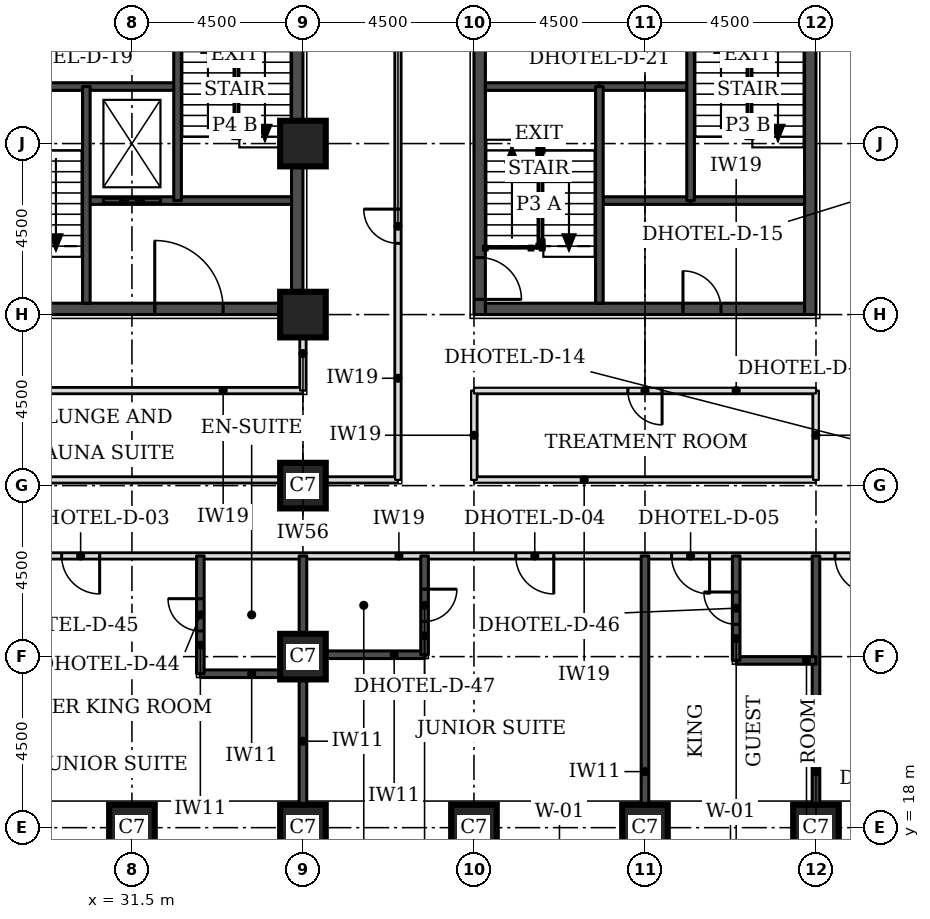
"""IFC4 building model, lengths in metres.
Left out: names, types, materials, properties, quantities, classifications, styles, units other than length and angle.
Written with IfcOpenShell. Run it as: python <this file> out.ifc"""

import sys

from ifc_helpers import new_model, si_unit, direction, frame, frame_2d, origin, origin_2d, place, context, subcontext, project, spatial, rectangle, extrude, element, fill, save


model = new_model("IFC4")
c1 = context("Model", 3, precision=1e-05, world=origin(), true_north=direction((0.0, 1.0)))
c2 = subcontext(c1, "Body", "Model", "MODEL_VIEW")
j1 = project(units=[si_unit("LENGTHUNIT", "METRE"), si_unit("PLANEANGLEUNIT", "RADIAN")], contexts=[c1])
p1 = place(None, origin())
s1 = spatial("IfcSite", under=j1, at=p1, CompositionType="ELEMENT")
p2 = place(p1, origin())
s2 = spatial("IfcBuilding", under=s1, at=p2, CompositionType="ELEMENT")
p3 = place(p2, frame((0.0, 0.0, 59.4)))
s3 = spatial("IfcBuildingStorey", under=s2, at=p3, CompositionType="ELEMENT", Elevation=59.4)
for number, where, z_axis, x_axis in (
    (1, (31.5, 18.0, 0.0), (0.0, 0.0, 1.0), (1.0, 0.0, 0.0)),
    (2, (36.0, 18.0, 0.0), (0.0, 0.0, 1.0), (1.0, 0.0, 0.0)),
    (3, (40.5, 18.0, 0.0), (0.0, 0.0, 1.0), (1.0, 0.0, 0.0)),
    (4, (45.0, 18.0, 0.0), (0.0, 0.0, 1.0), (1.0, 0.0, 0.0)),
    (5, (49.5, 18.0, 0.0), (0.0, 0.0, 1.0), (1.0, 0.0, 0.0)),
    (6, (36.0, 22.5, 0.0), (0.0, 0.0, 1.0), (1.0, 0.0, 0.0)),
    (7, (36.0, 27.0, 0.0), (0.0, 0.0, 1.0), (1.0, 0.0, 0.0)),
    (8, (36.0, 31.5, 0.0), (0.0, 0.0, 1.0), (1.0, 0.0, 0.0)),
    (9, (36.0, 36.0, 0.0), (0.0, 0.0, 1.0), (1.0, 0.0, 0.0)),
):
    element("IfcColumn", number, at=place(p3, frame(where, z_axis=z_axis, x_axis=x_axis)), inside=s3, PredefinedType="COLUMN", context=c2, shape_type="SweptSolid", body=[
        extrude(rectangle(XDim=1.2, YDim=1.2, at=origin_2d()), origin(), (0.0, 0.0, 1.0), 3.3),
    ])
p4 = place(p3, frame((40.8, 31.65, 0.0), z_axis=(0.0, 0.0, 1.0), x_axis=(1.0, 0.0, 0.0)))
e10 = element("IfcWall", 10, at=p4, inside=s3, PredefinedType="SHEAR", context=c2, shape_type="SweptSolid", body=[
    extrude(rectangle(XDim=8.4, YDim=0.3, at=frame_2d((4.2, 0.0))), origin(), (0.0, 0.0, 1.0), 3.3),
])
p5 = place(p4, frame((5.2, 0.0, 0.0)))
e11 = element("IfcOpeningElement", 11, at=p5, cuts=e10, PredefinedType="OPENING", context=c2, shape_type="SweptSolid", body=[
    extrude(rectangle(XDim=1.0, YDim=2.1, at=frame_2d((0.5, 1.05))), frame((0.0, 0.16, 0.0), z_axis=(0.0, -1.0, 0.0), x_axis=(1.0, 0.0, 0.0)), (0.0, 0.0, 1.0), 0.32),
])
p6 = place(p3, frame((40.65, 31.5, 0.0), z_axis=(0.0, 0.0, 1.0), x_axis=(0.0, 1.0, 0.0)))
e12 = element("IfcWall", 12, at=p6, inside=s3, PredefinedType="SHEAR", context=c2, shape_type="SweptSolid", body=[
    extrude(rectangle(XDim=9.0, YDim=0.3, at=frame_2d((4.5, 0.0))), origin(), (0.0, 0.0, 1.0), 3.3),
])
p7 = place(p6, frame((0.4, 0.0, 0.0)))
e13 = element("IfcOpeningElement", 13, at=p7, cuts=e12, PredefinedType="OPENING", context=c2, shape_type="SweptSolid", body=[
    extrude(rectangle(XDim=1.1, YDim=2.1, at=frame_2d((0.55, 1.05))), frame((0.0, 0.16, 0.0), z_axis=(0.0, -1.0, 0.0), x_axis=(1.0, 0.0, 0.0)), (0.0, 0.0, 1.0), 0.32),
])
p8 = place(p3, frame((49.35, 31.5, 0.0), z_axis=(0.0, 0.0, 1.0), x_axis=(0.0, 1.0, 0.0)))
e14 = element("IfcWall", 14, at=p8, inside=s3, PredefinedType="SHEAR", context=c2, shape_type="SweptSolid", body=[
    extrude(rectangle(XDim=9.0, YDim=0.3, at=frame_2d((4.5, 0.0))), origin(), (0.0, 0.0, 1.0), 3.3),
])
p9 = place(p3, frame((27.3, 31.65, 0.0), z_axis=(0.0, 0.0, 1.0), x_axis=(1.0, 0.0, 0.0)))
e15 = element("IfcWall", 15, at=p9, inside=s3, PredefinedType="SHEAR", context=c2, shape_type="SweptSolid", body=[
    extrude(rectangle(XDim=8.4, YDim=0.3, at=frame_2d((4.2, 0.0))), origin(), (0.0, 0.0, 1.0), 3.3),
])
p10 = place(p9, frame((4.8, 0.0, 0.0)))
e16 = element("IfcOpeningElement", 16, at=p10, cuts=e15, PredefinedType="OPENING", context=c2, shape_type="SweptSolid", body=[
    extrude(rectangle(XDim=1.8, YDim=2.1, at=frame_2d((0.9, 1.05))), frame((0.0, 0.16, 0.0), z_axis=(0.0, -1.0, 0.0), x_axis=(1.0, 0.0, 0.0)), (0.0, 0.0, 1.0), 0.32),
])
p11 = place(p3, frame((35.85, 31.5, 0.0), z_axis=(0.0, 0.0, 1.0), x_axis=(0.0, 1.0, 0.0)))
e17 = element("IfcWall", 17, at=p11, inside=s3, PredefinedType="SHEAR", context=c2, shape_type="SweptSolid", body=[
    extrude(rectangle(XDim=9.0, YDim=0.3, at=frame_2d((4.5, 0.0))), origin(), (0.0, 0.0, 1.0), 3.3),
])
p12 = place(p3, frame((19.15, 25.15, 0.0), z_axis=(0.0, 0.0, 1.0), x_axis=(1.0, 0.0, 0.0)))
e18 = element("IfcWall", 18, at=p12, inside=s3, PredefinedType="PARTITIONING", context=c2, shape_type="SweptSolid", body=[
    extrude(rectangle(XDim=32.35, YDim=0.15, at=frame_2d((16.175, 0.0))), origin(), (0.0, 0.0, 1.0), 3.08),
])
p13 = place(p12, frame((6.4, 0.0, 0.0)))
e19 = element("IfcOpeningElement", 19, at=p13, cuts=e18, PredefinedType="OPENING", context=c2, shape_type="SweptSolid", body=[
    extrude(rectangle(XDim=1.0, YDim=2.1, at=frame_2d((0.5, 1.05))), frame((0.0, 0.085, 0.0), z_axis=(0.0, -1.0, 0.0), x_axis=(1.0, 0.0, 0.0)), (0.0, 0.0, 1.0), 0.17),
])
p14 = place(p12, frame((10.5, 0.0, 0.0)))
e20 = element("IfcOpeningElement", 20, at=p14, cuts=e18, PredefinedType="OPENING", context=c2, shape_type="SweptSolid", body=[
    extrude(rectangle(XDim=1.0, YDim=2.1, at=frame_2d((0.5, 1.05))), frame((0.0, 0.085, 0.0), z_axis=(0.0, -1.0, 0.0), x_axis=(1.0, 0.0, 0.0)), (0.0, 0.0, 1.0), 0.17),
])
p15 = place(p12, frame((22.45, 0.0, 0.0)))
e21 = element("IfcOpeningElement", 21, at=p15, cuts=e18, PredefinedType="OPENING", context=c2, shape_type="SweptSolid", body=[
    extrude(rectangle(XDim=1.0, YDim=2.1, at=frame_2d((0.5, 1.05))), frame((0.0, 0.085, 0.0), z_axis=(0.0, -1.0, 0.0), x_axis=(1.0, 0.0, 0.0)), (0.0, 0.0, 1.0), 0.17),
])
p16 = place(p12, frame((26.55, 0.0, 0.0)))
e22 = element("IfcOpeningElement", 22, at=p16, cuts=e18, PredefinedType="OPENING", context=c2, shape_type="SweptSolid", body=[
    extrude(rectangle(XDim=1.0, YDim=2.1, at=frame_2d((0.5, 1.05))), frame((0.0, 0.085, 0.0), z_axis=(0.0, -1.0, 0.0), x_axis=(1.0, 0.0, 0.0)), (0.0, 0.0, 1.0), 0.17),
])
p17 = place(p12, frame((1.175, 0.0, 0.0)))
e23 = element("IfcOpeningElement", 23, at=p17, cuts=e18, PredefinedType="OPENING", context=c2, shape_type="SweptSolid", body=[
    extrude(rectangle(XDim=1.0, YDim=2.1, at=frame_2d((0.5, 1.05))), frame((0.0, 0.085, 0.0), z_axis=(0.0, -1.0, 0.0), x_axis=(1.0, 0.0, 0.0)), (0.0, 0.0, 1.0), 0.17),
])
p18 = place(p12, frame((30.85, 0.0, 0.0)))
e24 = element("IfcOpeningElement", 24, at=p18, cuts=e18, PredefinedType="OPENING", context=c2, shape_type="SweptSolid", body=[
    extrude(rectangle(XDim=1.0, YDim=2.1, at=frame_2d((0.5, 1.05))), frame((0.0, 0.085, 0.0), z_axis=(0.0, -1.0, 0.0), x_axis=(1.0, 0.0, 0.0)), (0.0, 0.0, 1.0), 0.17),
])
p19 = place(p3, frame((27.0, 27.15, 0.0), z_axis=(0.0, 0.0, 1.0), x_axis=(1.0, 0.0, 0.0)))
e25 = element("IfcWall", 25, at=p19, inside=s3, PredefinedType="PARTITIONING", context=c2, shape_type="SweptSolid", body=[
    extrude(rectangle(XDim=11.5, YDim=0.15, at=frame_2d((5.75, 0.0))), origin(), (0.0, 0.0, 1.0), 3.08),
])
p20 = place(p3, frame((38.5, 27.15, 0.0), z_axis=(0.0, 0.0, 1.0), x_axis=(0.0, 1.0, 0.0)))
e26 = element("IfcWall", 26, at=p20, inside=s3, PredefinedType="PARTITIONING", context=c2, shape_type="SweptSolid", body=[
    extrude(rectangle(XDim=13.35, YDim=0.15, at=frame_2d((6.675, 0.0))), origin(), (0.0, 0.0, 1.0), 3.08),
])
p21 = place(p20, frame((6.225, 0.0, 0.0)))
e27 = element("IfcOpeningElement", 27, at=p21, cuts=e26, PredefinedType="OPENING", context=c2, shape_type="SweptSolid", body=[
    extrude(rectangle(XDim=0.9, YDim=2.1, at=frame_2d((0.45, 1.05))), frame((0.0, 0.085, 0.0), z_axis=(0.0, -1.0, 0.0), x_axis=(1.0, 0.0, 0.0)), (0.0, 0.0, 1.0), 0.17),
])
p22 = place(p3, frame((40.5, 27.15, 0.0), z_axis=(0.0, 0.0, 1.0), x_axis=(1.0, 0.0, 0.0)))
e28 = element("IfcWall", 28, at=p22, inside=s3, PredefinedType="PARTITIONING", context=c2, shape_type="SweptSolid", body=[
    extrude(rectangle(XDim=9.0, YDim=0.15, at=frame_2d((4.5, 0.0))), origin(), (0.0, 0.0, 1.0), 3.08),
])
for number, where, z_axis, x_axis in (
    (29, (40.5, 27.15, 0.0), (0.0, 0.0, 1.0), (0.0, 1.0, 0.0)),
    (30, (49.5, 27.15, 0.0), (0.0, 0.0, 1.0), (0.0, 1.0, 0.0)),
):
    element("IfcWall", number, at=place(p3, frame(where, z_axis=z_axis, x_axis=x_axis)), inside=s3, PredefinedType="PARTITIONING", context=c2, shape_type="SweptSolid", body=[
        extrude(rectangle(XDim=2.35, YDim=0.15, at=frame_2d((1.175, 0.0))), origin(), (0.0, 0.0, 1.0), 3.08),
    ])
p23 = place(p3, frame((27.0, 29.5, 0.0), z_axis=(0.0, 0.0, 1.0), x_axis=(1.0, 0.0, 0.0)))
e31 = element("IfcWall", 31, at=p23, inside=s3, PredefinedType="PARTITIONING", context=c2, shape_type="SweptSolid", body=[
    extrude(rectangle(XDim=9.0, YDim=0.15, at=frame_2d((4.5, 0.0))), origin(), (0.0, 0.0, 1.0), 3.08),
])
p24 = place(p3, frame((36.0, 29.5, 0.0), z_axis=(0.0, 0.0, 1.0), x_axis=(0.0, 1.0, 0.0)))
e32 = element("IfcWall", 32, at=p24, inside=s3, PredefinedType="PARTITIONING", context=c2, shape_type="SweptSolid", body=[
    extrude(rectangle(XDim=1.95, YDim=0.15, at=frame_2d((0.975, 0.0))), origin(), (0.0, 0.0, 1.0), 2.33),
])
p25 = place(p3, frame((40.5, 29.5, 0.0), z_axis=(0.0, 0.0, 1.0), x_axis=(1.0, 0.0, 0.0)))
e33 = element("IfcWall", 33, at=p25, inside=s3, PredefinedType="PARTITIONING", context=c2, shape_type="SweptSolid", body=[
    extrude(rectangle(XDim=9.0, YDim=0.15, at=frame_2d((4.5, 0.0))), origin(), (0.0, 0.0, 1.0), 3.08),
])
p26 = place(p25, frame((4.05, 0.0, 0.0)))
e34 = element("IfcOpeningElement", 34, at=p26, cuts=e33, PredefinedType="OPENING", context=c2, shape_type="SweptSolid", body=[
    extrude(rectangle(XDim=0.9, YDim=2.1, at=frame_2d((0.45, 1.05))), frame((0.0, 0.085, 0.0), z_axis=(0.0, -1.0, 0.0), x_axis=(1.0, 0.0, 0.0)), (0.0, 0.0, 1.0), 0.17),
])
for number, where, z_axis, x_axis in (
    (35, (36.0, 18.6, 0.0), (0.0, 0.0, 1.0), (0.0, 1.0, 0.0)),
    (36, (45.0, 18.6, 0.0), (0.0, 0.0, 1.0), (0.0, 1.0, 0.0)),
    (37, (49.5, 18.6, 0.0), (0.0, 0.0, 1.0), (0.0, 1.0, 0.0)),
):
    element("IfcWall", number, at=place(p3, frame(where, z_axis=z_axis, x_axis=x_axis)), inside=s3, PredefinedType="SOLIDWALL", context=c2, shape_type="SweptSolid", body=[
        extrude(rectangle(XDim=6.55, YDim=0.2, at=frame_2d((3.275, 0.0))), origin(), (0.0, 0.0, 1.0), 3.08),
    ])
p27 = place(p3, frame((33.3, 22.05, 0.0), z_axis=(0.0, 0.0, 1.0), x_axis=(1.0, 0.0, 0.0)))
e38 = element("IfcWall", 38, at=p27, inside=s3, PredefinedType="SOLIDWALL", context=c2, shape_type="SweptSolid", body=[
    extrude(rectangle(XDim=2.7, YDim=0.2, at=frame_2d((1.35, 0.0))), origin(), (0.0, 0.0, 1.0), 3.08),
])
p28 = place(p3, frame((33.3, 22.05, 0.0), z_axis=(0.0, 0.0, 1.0), x_axis=(0.0, 1.0, 0.0)))
e39 = element("IfcWall", 39, at=p28, inside=s3, PredefinedType="SOLIDWALL", context=c2, shape_type="SweptSolid", body=[
    extrude(rectangle(XDim=3.1, YDim=0.2, at=frame_2d((1.55, 0.0))), origin(), (0.0, 0.0, 1.0), 3.08),
])
p29 = place(p28, frame((1.125, 0.0, 0.0)))
e40 = element("IfcOpeningElement", 40, at=p29, cuts=e39, PredefinedType="OPENING", context=c2, shape_type="SweptSolid", body=[
    extrude(rectangle(XDim=0.85, YDim=2.1, at=frame_2d((0.425, 1.05))), frame((0.0, 0.11, 0.0), z_axis=(0.0, -1.0, 0.0), x_axis=(1.0, 0.0, 0.0)), (0.0, 0.0, 1.0), 0.22),
])
p30 = place(p3, frame((47.4, 22.4, 0.0), z_axis=(0.0, 0.0, 1.0), x_axis=(1.0, 0.0, 0.0)))
e41 = element("IfcWall", 41, at=p30, inside=s3, PredefinedType="SOLIDWALL", context=c2, shape_type="SweptSolid", body=[
    extrude(rectangle(XDim=2.1, YDim=0.2, at=frame_2d((1.05, 0.0))), origin(), (0.0, 0.0, 1.0), 3.08),
])
p31 = place(p3, frame((47.4, 22.4, 0.0), z_axis=(0.0, 0.0, 1.0), x_axis=(0.0, 1.0, 0.0)))
e42 = element("IfcWall", 42, at=p31, inside=s3, PredefinedType="SOLIDWALL", context=c2, shape_type="SweptSolid", body=[
    extrude(rectangle(XDim=2.75, YDim=0.2, at=frame_2d((1.375, 0.0))), origin(), (0.0, 0.0, 1.0), 3.08),
])
p32 = place(p31, frame((0.95, 0.0, 0.0)))
e43 = element("IfcOpeningElement", 43, at=p32, cuts=e42, PredefinedType="OPENING", context=c2, shape_type="SweptSolid", body=[
    extrude(rectangle(XDim=0.85, YDim=2.1, at=frame_2d((0.425, 1.05))), frame((0.0, 0.11, 0.0), z_axis=(0.0, -1.0, 0.0), x_axis=(1.0, 0.0, 0.0)), (0.0, 0.0, 1.0), 0.22),
])
p33 = place(p3, frame((36.0, 22.55, 0.0), z_axis=(0.0, 0.0, 1.0), x_axis=(1.0, 0.0, 0.0)))
e44 = element("IfcWall", 44, at=p33, inside=s3, PredefinedType="SOLIDWALL", context=c2, shape_type="SweptSolid", body=[
    extrude(rectangle(XDim=3.2, YDim=0.2, at=frame_2d((1.6, 0.0))), origin(), (0.0, 0.0, 1.0), 3.08),
])
p34 = place(p3, frame((39.2, 22.55, 0.0), z_axis=(0.0, 0.0, 1.0), x_axis=(0.0, 1.0, 0.0)))
e45 = element("IfcWall", 45, at=p34, inside=s3, PredefinedType="SOLIDWALL", context=c2, shape_type="SweptSolid", body=[
    extrude(rectangle(XDim=2.6, YDim=0.2, at=frame_2d((1.3, 0.0))), origin(), (0.0, 0.0, 1.0), 3.08),
])
p35 = place(p34, frame((0.875, 0.0, 0.0)))
e46 = element("IfcOpeningElement", 46, at=p35, cuts=e45, PredefinedType="OPENING", context=c2, shape_type="SweptSolid", body=[
    extrude(rectangle(XDim=0.85, YDim=2.1, at=frame_2d((0.425, 1.05))), frame((0.0, 0.11, 0.0), z_axis=(0.0, -1.0, 0.0), x_axis=(1.0, 0.0, 0.0)), (0.0, 0.0, 1.0), 0.22),
])
p36 = place(p3, frame((43.8, 34.5, 0.0), z_axis=(0.0, 0.0, 1.0), x_axis=(1.0, 0.0, 0.0)))
e47 = element("IfcWall", 47, at=p36, inside=s3, PredefinedType="SOLIDWALL", context=c2, shape_type="SweptSolid", body=[
    extrude(rectangle(XDim=2.4, YDim=0.2, at=frame_2d((1.2, 0.0))), origin(), (0.0, 0.0, 1.0), 3.08),
])
p37 = place(p3, frame((46.2, 34.5, 0.0), z_axis=(0.0, 0.0, 1.0), x_axis=(1.0, 0.0, 0.0)))
e48 = element("IfcWall", 48, at=p37, inside=s3, PredefinedType="SOLIDWALL", context=c2, shape_type="SweptSolid", body=[
    extrude(rectangle(XDim=3.0, YDim=0.2, at=frame_2d((1.5, 0.0))), origin(), (0.0, 0.0, 1.0), 3.08),
])
p38 = place(p3, frame((43.8, 37.5, 0.0), z_axis=(0.0, 0.0, 1.0), x_axis=(1.0, 0.0, 0.0)))
e49 = element("IfcWall", 49, at=p38, inside=s3, PredefinedType="SOLIDWALL", context=c2, shape_type="SweptSolid", body=[
    extrude(rectangle(XDim=2.4, YDim=0.2, at=frame_2d((1.2, 0.0))), origin(), (0.0, 0.0, 1.0), 3.3),
])
p39 = place(p3, frame((40.8, 37.5, 0.0), z_axis=(0.0, 0.0, 1.0), x_axis=(1.0, 0.0, 0.0)))
e50 = element("IfcWall", 50, at=p39, inside=s3, PredefinedType="SOLIDWALL", context=c2, shape_type="SweptSolid", body=[
    extrude(rectangle(XDim=3.0, YDim=0.2, at=frame_2d((1.5, 0.0))), origin(), (0.0, 0.0, 1.0), 3.08),
])
for number, where, z_axis, x_axis in (
    (51, (43.8, 31.8, 0.0), (0.0, 0.0, 1.0), (0.0, 1.0, 0.0)),
    (52, (46.2, 34.5, 0.0), (0.0, 0.0, 1.0), (0.0, 1.0, 0.0)),
):
    element("IfcWall", number, at=place(p3, frame(where, z_axis=z_axis, x_axis=x_axis)), inside=s3, PredefinedType="SOLIDWALL", context=c2, shape_type="SweptSolid", body=[
        extrude(rectangle(XDim=5.7, YDim=0.2, at=frame_2d((2.85, 0.0))), origin(), (0.0, 0.0, 1.0), 3.08),
    ])
p40 = place(p3, frame((30.3, 34.5, 0.0), z_axis=(0.0, 0.0, 1.0), x_axis=(1.0, 0.0, 0.0)))
e53 = element("IfcWall", 53, at=p40, inside=s3, PredefinedType="SOLIDWALL", context=c2, shape_type="SweptSolid", body=[
    extrude(rectangle(XDim=5.4, YDim=0.2, at=frame_2d((2.7, 0.0))), origin(), (0.0, 0.0, 1.0), 3.08),
])
p41 = place(p40, frame((0.45, 0.0, 0.0)))
e54 = element("IfcOpeningElement", 54, at=p41, cuts=e53, PredefinedType="OPENING", context=c2, shape_type="SweptSolid", body=[
    extrude(rectangle(XDim=1.5, YDim=2.1, at=frame_2d((0.75, 1.05))), frame((0.0, 0.11, 0.0), z_axis=(0.0, -1.0, 0.0), x_axis=(1.0, 0.0, 0.0)), (0.0, 0.0, 1.0), 0.22),
])
p42 = place(p3, frame((27.3, 37.5, 0.0), z_axis=(0.0, 0.0, 1.0), x_axis=(1.0, 0.0, 0.0)))
e55 = element("IfcWall", 55, at=p42, inside=s3, PredefinedType="SOLIDWALL", context=c2, shape_type="SweptSolid", body=[
    extrude(rectangle(XDim=5.4, YDim=0.2, at=frame_2d((2.7, 0.0))), origin(), (0.0, 0.0, 1.0), 3.08),
])
for number, where, z_axis, x_axis in (
    (56, (30.3, 31.8, 0.0), (0.0, 0.0, 1.0), (0.0, 1.0, 0.0)),
    (57, (32.7, 34.5, 0.0), (0.0, 0.0, 1.0), (0.0, 1.0, 0.0)),
):
    element("IfcWall", number, at=place(p3, frame(where, z_axis=z_axis, x_axis=x_axis)), inside=s3, PredefinedType="SOLIDWALL", context=c2, shape_type="SweptSolid", body=[
        extrude(rectangle(XDim=5.7, YDim=0.2, at=frame_2d((2.85, 0.0))), origin(), (0.0, 0.0, 1.0), 3.08),
    ])
p43 = place(p14, frame((1.0, 0.0, 0.0), z_axis=(0.0, 0.0, 1.0), x_axis=(-1.0, 0.0, 0.0)))
e58 = element("IfcDoor", 58, at=p43, inside=s3, OperationType="SINGLE_SWING_LEFT", PredefinedType="DOOR", context=c2, shape_type="SweptSolid", body=[
    extrude(rectangle(XDim=1.0, YDim=2.1, at=frame_2d((0.5, 1.05))), frame((0.0, 0.025, 0.0), z_axis=(0.0, -1.0, 0.0), x_axis=(1.0, 0.0, 0.0)), (0.0, 0.0, 1.0), 0.05),
])
fill(e20, e58)
p44 = place(p29, origin())
e59 = element("IfcDoor", 59, at=p44, inside=s3, OperationType="SINGLE_SWING_RIGHT", PredefinedType="DOOR", context=c2, shape_type="SweptSolid", body=[
    extrude(rectangle(XDim=0.85, YDim=2.1, at=frame_2d((0.425, 1.05))), frame((0.0, 0.025, 0.0), z_axis=(0.0, -1.0, 0.0), x_axis=(1.0, 0.0, 0.0)), (0.0, 0.0, 1.0), 0.05),
])
fill(e40, e59)
p45 = place(p15, frame((1.0, 0.0, 0.0), z_axis=(0.0, 0.0, 1.0), x_axis=(-1.0, 0.0, 0.0)))
e60 = element("IfcDoor", 60, at=p45, inside=s3, OperationType="SINGLE_SWING_LEFT", PredefinedType="DOOR", context=c2, shape_type="SweptSolid", body=[
    extrude(rectangle(XDim=1.0, YDim=2.1, at=frame_2d((0.5, 1.05))), frame((0.0, 0.025, 0.0), z_axis=(0.0, -1.0, 0.0), x_axis=(1.0, 0.0, 0.0)), (0.0, 0.0, 1.0), 0.05),
])
fill(e21, e60)
p46 = place(p35, frame((0.85, 0.0, 0.0), z_axis=(0.0, 0.0, 1.0), x_axis=(-1.0, 0.0, 0.0)))
e61 = element("IfcDoor", 61, at=p46, inside=s3, OperationType="SINGLE_SWING_LEFT", PredefinedType="DOOR", context=c2, shape_type="SweptSolid", body=[
    extrude(rectangle(XDim=0.85, YDim=2.1, at=frame_2d((0.425, 1.05))), frame((0.0, 0.025, 0.0), z_axis=(0.0, -1.0, 0.0), x_axis=(1.0, 0.0, 0.0)), (0.0, 0.0, 1.0), 0.05),
])
fill(e46, e61)
p47 = place(p16, frame((1.0, 0.0, 0.0), z_axis=(0.0, 0.0, 1.0), x_axis=(-1.0, 0.0, 0.0)))
e62 = element("IfcDoor", 62, at=p47, inside=s3, OperationType="SINGLE_SWING_LEFT", PredefinedType="DOOR", context=c2, shape_type="SweptSolid", body=[
    extrude(rectangle(XDim=1.0, YDim=2.1, at=frame_2d((0.5, 1.05))), frame((0.0, 0.025, 0.0), z_axis=(0.0, -1.0, 0.0), x_axis=(1.0, 0.0, 0.0)), (0.0, 0.0, 1.0), 0.05),
])
fill(e22, e62)
p48 = place(p32, origin())
e63 = element("IfcDoor", 63, at=p48, inside=s3, OperationType="SINGLE_SWING_RIGHT", PredefinedType="DOOR", context=c2, shape_type="SweptSolid", body=[
    extrude(rectangle(XDim=0.85, YDim=2.1, at=frame_2d((0.425, 1.05))), frame((0.0, 0.025, 0.0), z_axis=(0.0, -1.0, 0.0), x_axis=(1.0, 0.0, 0.0)), (0.0, 0.0, 1.0), 0.05),
])
fill(e43, e63)
p49 = place(p18, frame((1.0, 0.0, 0.0), z_axis=(0.0, 0.0, 1.0), x_axis=(-1.0, 0.0, 0.0)))
e64 = element("IfcDoor", 64, at=p49, inside=s3, OperationType="SINGLE_SWING_LEFT", PredefinedType="DOOR", context=c2, shape_type="SweptSolid", body=[
    extrude(rectangle(XDim=1.0, YDim=2.1, at=frame_2d((0.5, 1.05))), frame((0.0, 0.025, 0.0), z_axis=(0.0, -1.0, 0.0), x_axis=(1.0, 0.0, 0.0)), (0.0, 0.0, 1.0), 0.05),
])
fill(e24, e64)
p50 = place(p21, origin())
e65 = element("IfcDoor", 65, at=p50, inside=s3, OperationType="SINGLE_SWING_RIGHT", PredefinedType="DOOR", context=c2, shape_type="SweptSolid", body=[
    extrude(rectangle(XDim=0.9, YDim=2.1, at=frame_2d((0.45, 1.05))), frame((0.0, 0.025, 0.0), z_axis=(0.0, -1.0, 0.0), x_axis=(1.0, 0.0, 0.0)), (0.0, 0.0, 1.0), 0.05),
])
fill(e27, e65)
p51 = place(p26, frame((0.9, 0.0, 0.0), z_axis=(0.0, 0.0, 1.0), x_axis=(-1.0, 0.0, 0.0)))
e66 = element("IfcDoor", 66, at=p51, inside=s3, OperationType="SINGLE_SWING_LEFT", PredefinedType="DOOR", context=c2, shape_type="SweptSolid", body=[
    extrude(rectangle(XDim=0.9, YDim=2.1, at=frame_2d((0.45, 1.05))), frame((0.0, 0.025, 0.0), z_axis=(0.0, -1.0, 0.0), x_axis=(1.0, 0.0, 0.0)), (0.0, 0.0, 1.0), 0.05),
])
fill(e34, e66)
p52 = place(p7, frame((1.1, 0.0, 0.0), z_axis=(0.0, 0.0, 1.0), x_axis=(-1.0, 0.0, 0.0)))
e67 = element("IfcDoor", 67, at=p52, inside=s3, OperationType="SINGLE_SWING_RIGHT", PredefinedType="DOOR", context=c2, shape_type="SweptSolid", body=[
    extrude(rectangle(XDim=1.1, YDim=2.1, at=frame_2d((0.55, 1.05))), frame((0.0, 0.025, 0.0), z_axis=(0.0, -1.0, 0.0), x_axis=(1.0, 0.0, 0.0)), (0.0, 0.0, 1.0), 0.05),
])
fill(e13, e67)
p53 = place(p5, origin())
e68 = element("IfcDoor", 68, at=p53, inside=s3, OperationType="SINGLE_SWING_LEFT", PredefinedType="DOOR", context=c2, shape_type="SweptSolid", body=[
    extrude(rectangle(XDim=1.0, YDim=2.1, at=frame_2d((0.5, 1.05))), frame((0.0, 0.025, 0.0), z_axis=(0.0, -1.0, 0.0), x_axis=(1.0, 0.0, 0.0)), (0.0, 0.0, 1.0), 0.05),
])
fill(e11, e68)
p54 = place(p41, origin())
e69 = element("IfcDoor", 69, at=p54, inside=s3, OperationType="DOUBLE_DOOR_SLIDING", PredefinedType="DOOR", context=c2, shape_type="SweptSolid", body=[
    extrude(rectangle(XDim=1.5, YDim=2.1, at=frame_2d((0.75, 1.05))), frame((0.0, 0.025, 0.0), z_axis=(0.0, -1.0, 0.0), x_axis=(1.0, 0.0, 0.0)), (0.0, 0.0, 1.0), 0.05),
])
fill(e54, e69)
p55 = place(p10, origin())
e70 = element("IfcDoor", 70, at=p55, inside=s3, OperationType="SINGLE_SWING_LEFT", PredefinedType="DOOR", context=c2, shape_type="SweptSolid", body=[
    extrude(rectangle(XDim=1.8, YDim=2.1, at=frame_2d((0.9, 1.05))), frame((0.0, 0.025, 0.0), z_axis=(0.0, -1.0, 0.0), x_axis=(1.0, 0.0, 0.0)), (0.0, 0.0, 1.0), 0.05),
])
fill(e16, e70)
save(model, sys.argv[1])
